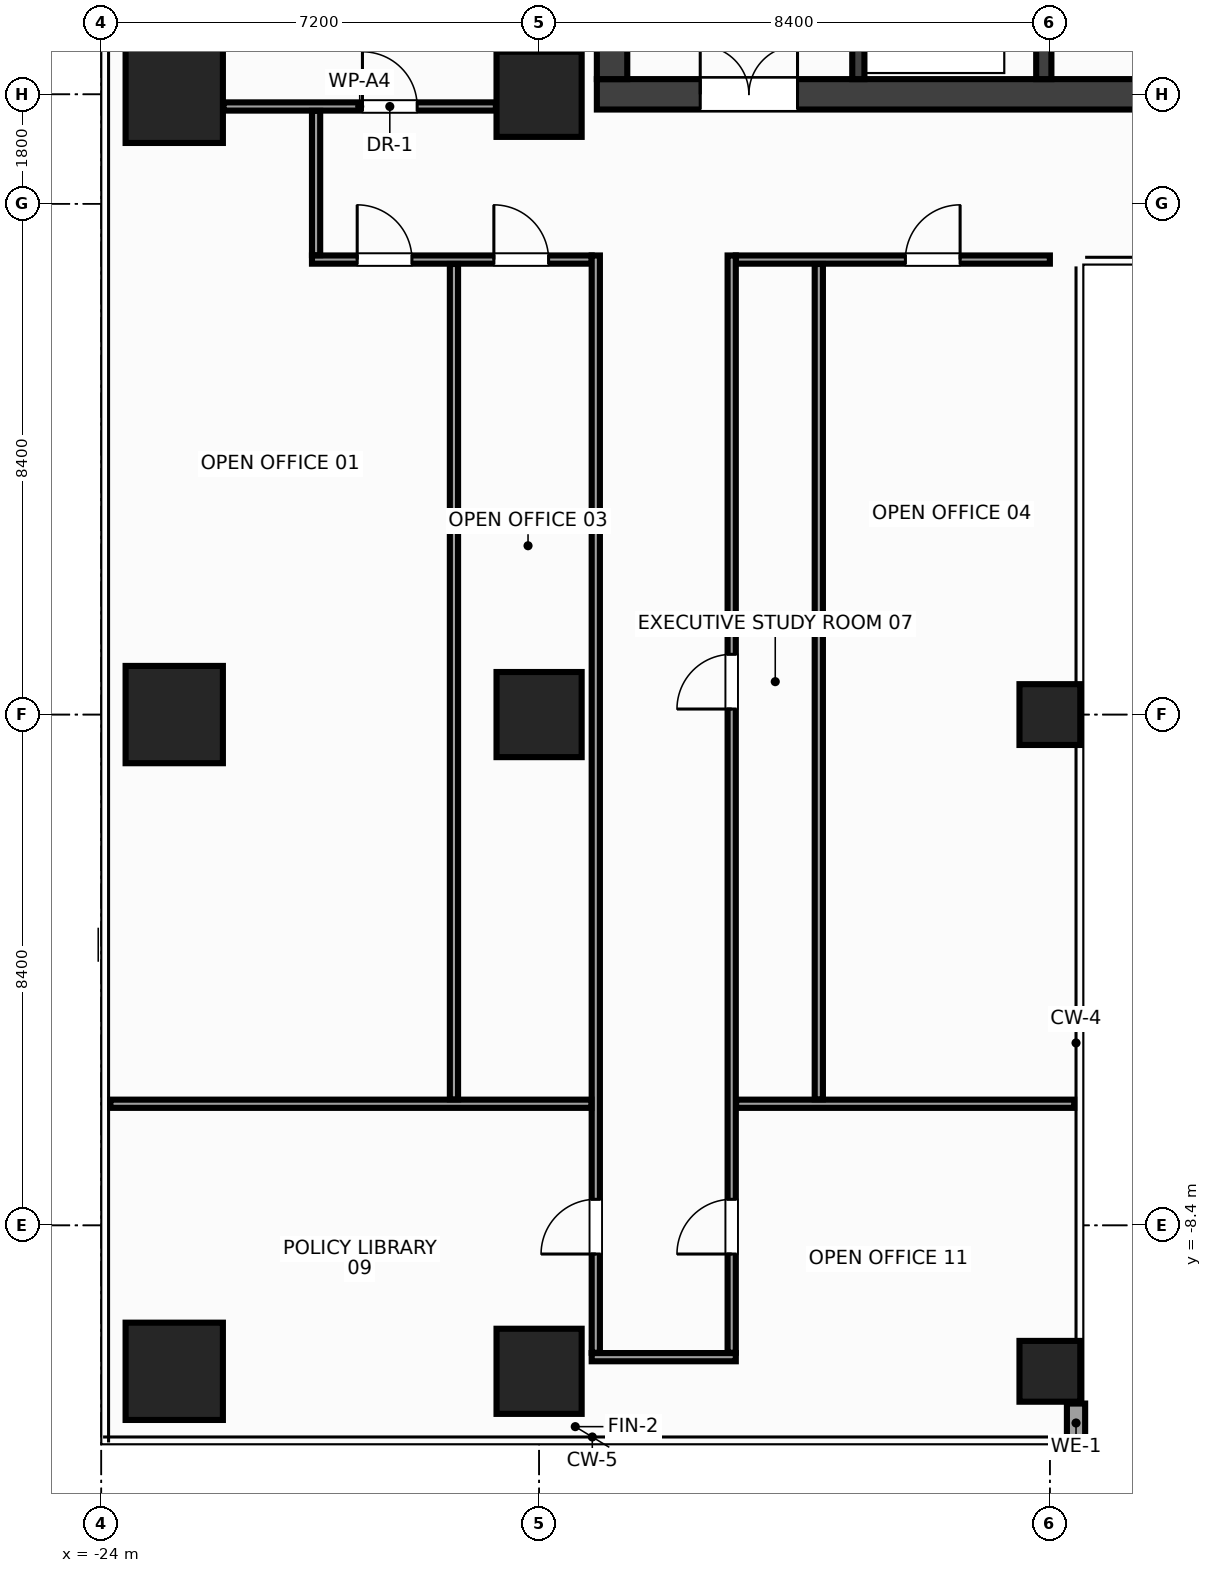
"""IFC4 building model, lengths in metres.
Left out: names, types, materials, properties, quantities, classifications, styles, units other than length and angle.
Written with IfcOpenShell. Run it as: python <this file> out.ifc"""

import sys

from ifc_helpers import new_model, si_unit, direction, frame, frame_2d, origin, origin_2d, place, context, subcontext, project, spatial, rectangle, hollow_rectangle, extrude, source, transform, mapped, element, fill, save


model = new_model("IFC4")
c1 = context("Model", 3, precision=1e-05, world=origin(), true_north=direction((0.0, 1.0)))
c2 = subcontext(c1, "Body", "Model", "MODEL_VIEW")
j1 = project(units=[si_unit("LENGTHUNIT", "METRE"), si_unit("PLANEANGLEUNIT", "RADIAN")], contexts=[c1])
p1 = place(None, origin())
s1 = spatial("IfcSite", under=j1, at=p1, CompositionType="ELEMENT")
p2 = place(p1, origin())
s2 = spatial("IfcBuilding", under=s1, at=p2, CompositionType="ELEMENT")
p3 = place(p2, frame((0.0, 0.0, 200.0)))
s3 = spatial("IfcBuildingStorey", under=s2, at=p3, CompositionType="ELEMENT", Elevation=200.0)
m1 = source(origin(), c2, "Body", "SweptSolid", [
    extrude(rectangle(XDim=31.7, YDim=0.5, at=frame_2d((15.85, 0.0))), origin(), (0.0, 0.0, 1.0), 3.6),
])
p4 = place(p3, frame((-15.85, 10.2, 0.0), z_axis=(0.0, 0.0, 1.0), x_axis=(1.0, 0.0, 0.0)))
e1 = element("IfcWall", 1, at=p4, inside=s3, PredefinedType="SHEAR", context=c2, shape_type="MappedRepresentation", body=[
    mapped(m1, transform((0.0, 0.0, 0.0), x_axis=(1.0, 0.0, 0.0), y_axis=(0.0, 1.0, 0.0), z_axis=(0.0, 0.0, 1.0), scale=1.0)),
])
p5 = place(p4, frame((1.7, 0.0, 0.0)))
e2 = element("IfcOpeningElement", 2, at=p5, cuts=e1, PredefinedType="OPENING", context=c2, shape_type="SweptSolid", body=[
    extrude(rectangle(XDim=1.6, YDim=2.15, at=frame_2d((0.8, 1.075))), frame((0.0, 0.262, 0.0), z_axis=(0.0, -1.0, 0.0), x_axis=(1.0, 0.0, 0.0)), (0.0, 0.0, 1.0), 0.524),
])
p6 = place(p4, frame((28.4, 0.0, 0.0)))
e3 = element("IfcOpeningElement", 3, at=p6, cuts=e1, PredefinedType="OPENING", context=c2, shape_type="SweptSolid", body=[
    extrude(rectangle(XDim=1.6, YDim=2.15, at=frame_2d((0.8, 1.075))), frame((0.0, 0.262, 0.0), z_axis=(0.0, -1.0, 0.0), x_axis=(1.0, 0.0, 0.0)), (0.0, 0.0, 1.0), 0.524),
])
p7 = place(p4, frame((15.1, 0.0, 0.0)))
e4 = element("IfcOpeningElement", 4, at=p7, cuts=e1, PredefinedType="OPENING", context=c2, shape_type="SweptSolid", body=[
    extrude(rectangle(XDim=1.5, YDim=2.2, at=frame_2d((0.75, 1.1))), frame((0.0, 0.262, 0.0), z_axis=(0.0, -1.0, 0.0), x_axis=(1.0, 0.0, 0.0)), (0.0, 0.0, 1.0), 0.524),
])
m2 = source(origin(), c2, "Body", "SweptSolid", [
    extrude(rectangle(XDim=13.1, YDim=0.5, at=frame_2d((6.55, 0.0))), origin(), (0.0, 0.0, 1.0), 3.6),
])
p8 = place(p3, frame((-15.6, 10.45, 0.0), z_axis=(0.0, 0.0, 1.0), x_axis=(0.0, 1.0, 0.0)))
e5 = element("IfcWall", 5, at=p8, inside=s3, PredefinedType="SHEAR", context=c2, shape_type="MappedRepresentation", body=[
    mapped(m2, transform((0.0, 0.0, 0.0), x_axis=(1.0, 0.0, 0.0), y_axis=(0.0, 1.0, 0.0), z_axis=(0.0, 0.0, 1.0), scale=1.0)),
])
m3 = source(origin(), c2, "Body", "SweptSolid", [
    extrude(rectangle(XDim=13.1, YDim=0.25, at=frame_2d((6.55, 0.0))), origin(), (0.0, 0.0, 1.0), 3.6),
])
p9 = place(p3, frame((-8.5, 10.45, 0.0), z_axis=(0.0, 0.0, 1.0), x_axis=(0.0, 1.0, 0.0)))
e6 = element("IfcWall", 6, at=p9, inside=s3, PredefinedType="SHEAR", context=c2, shape_type="MappedRepresentation", body=[
    mapped(m3, transform((0.0, 0.0, 0.0), x_axis=(1.0, 0.0, 0.0), y_axis=(0.0, 1.0, 0.0), z_axis=(0.0, 0.0, 1.0), scale=1.0)),
])
p10 = place(p9, frame((4.22, 0.0, 0.0)))
e7 = element("IfcOpeningElement", 7, at=p10, cuts=e6, PredefinedType="OPENING", context=c2, shape_type="SweptSolid", body=[
    extrude(rectangle(XDim=1.1, YDim=2.15, at=frame_2d((0.55, 1.075))), frame((0.0, 0.137, 0.0), z_axis=(0.0, -1.0, 0.0), x_axis=(1.0, 0.0, 0.0)), (0.0, 0.0, 1.0), 0.274),
])
p11 = place(p9, frame((6.14, 0.0, 0.0)))
e8 = element("IfcOpeningElement", 8, at=p11, cuts=e6, PredefinedType="OPENING", context=c2, shape_type="SweptSolid", body=[
    extrude(rectangle(XDim=1.1, YDim=2.15, at=frame_2d((0.55, 1.075))), frame((0.0, 0.137, 0.0), z_axis=(0.0, -1.0, 0.0), x_axis=(1.0, 0.0, 0.0)), (0.0, 0.0, 1.0), 0.274),
])
p12 = place(p9, frame((8.06, 0.0, 0.0)))
e9 = element("IfcOpeningElement", 9, at=p12, cuts=e6, PredefinedType="OPENING", context=c2, shape_type="SweptSolid", body=[
    extrude(rectangle(XDim=1.1, YDim=2.15, at=frame_2d((0.55, 1.075))), frame((0.0, 0.137, 0.0), z_axis=(0.0, -1.0, 0.0), x_axis=(1.0, 0.0, 0.0)), (0.0, 0.0, 1.0), 0.274),
])
m4 = source(origin(), c2, "Body", "SweptSolid", [
    extrude(rectangle(XDim=3.2, YDim=0.2, at=frame_2d((1.6, 0.0))), origin(), (0.0, 0.0, 1.0), 3.6),
])
p13 = place(p3, frame((-11.55, 10.45, 0.0), z_axis=(0.0, 0.0, 1.0), x_axis=(0.0, 1.0, 0.0)))
e10 = element("IfcWall", 10, at=p13, inside=s3, PredefinedType="SHEAR", context=c2, shape_type="MappedRepresentation", body=[
    mapped(m4, transform((0.0, 0.0, 0.0), x_axis=(1.0, 0.0, 0.0), y_axis=(0.0, 1.0, 0.0), z_axis=(0.0, 0.0, 1.0), scale=1.0)),
])
p14 = place(p13, frame((0.9, 0.0, 0.0)))
e11 = element("IfcOpeningElement", 11, at=p14, cuts=e10, PredefinedType="OPENING", context=c2, shape_type="SweptSolid", body=[
    extrude(rectangle(XDim=1.1, YDim=2.15, at=frame_2d((0.55, 1.075))), frame((0.0, 0.112, 0.0), z_axis=(0.0, -1.0, 0.0), x_axis=(1.0, 0.0, 0.0)), (0.0, 0.0, 1.0), 0.224),
])
m5 = source(origin(), c2, "Body", "SweptSolid", [
    extrude(rectangle(XDim=1.4, YDim=1.4, at=origin_2d()), origin(), (0.0, 0.0, 1.0), 3.6),
])
for number, where, z_axis, x_axis in (
    (12, (-16.8, -10.8, 0.0), (0.0, 0.0, 1.0), (1.0, 0.0, 0.0)),
    (13, (-16.8, 0.0, 0.0), (0.0, 0.0, 1.0), (1.0, 0.0, 0.0)),
    (14, (-16.8, 10.2, 0.0), (0.0, 0.0, 1.0), (1.0, 0.0, 0.0)),
):
    element("IfcColumn", number, at=place(p3, frame(where, z_axis=z_axis, x_axis=x_axis)), inside=s3, PredefinedType="COLUMN", context=c2, shape_type="MappedRepresentation", body=[
        mapped(m5, transform((0.0, 0.0, 0.0), x_axis=(1.0, 0.0, 0.0), y_axis=(0.0, 1.0, 0.0), z_axis=(0.0, 0.0, 1.0), scale=1.0)),
    ])
m6 = source(origin(), c2, "Body", "SweptSolid", [
    extrude(rectangle(XDim=1.6, YDim=1.6, at=origin_2d()), origin(), (0.0, 0.0, 1.0), 3.6),
])
for number, where, z_axis, x_axis in (
    (15, (-22.8, -10.8, 0.0), (0.0, 0.0, 1.0), (1.0, 0.0, 0.0)),
    (16, (-22.8, 0.0, 0.0), (0.0, 0.0, 1.0), (1.0, 0.0, 0.0)),
    (17, (-22.8, 10.2, 0.0), (0.0, 0.0, 1.0), (1.0, 0.0, 0.0)),
):
    element("IfcColumn", number, at=place(p3, frame(where, z_axis=z_axis, x_axis=x_axis)), inside=s3, PredefinedType="COLUMN", context=c2, shape_type="MappedRepresentation", body=[
        mapped(m6, transform((0.0, 0.0, 0.0), x_axis=(1.0, 0.0, 0.0), y_axis=(0.0, 1.0, 0.0), z_axis=(0.0, 0.0, 1.0), scale=1.0)),
    ])
m7 = source(origin(), c2, "Body", "SweptSolid", [
    extrude(hollow_rectangle(XDim=1.0, YDim=1.0, WallThickness=0.045, at=origin_2d()), origin(), (0.0, 0.0, 1.0), 3.6),
])
for number, where, z_axis, x_axis in (
    (18, (-8.4, 0.0, 0.0), (0.0, 0.0, 1.0), (1.0, 0.0, 0.0)),
    (19, (-8.4, -10.8, 0.0), (0.0, 0.0, 1.0), (1.0, 0.0, 0.0)),
):
    element("IfcColumn", number, at=place(p3, frame(where, z_axis=z_axis, x_axis=x_axis)), inside=s3, PredefinedType="COLUMN", context=c2, shape_type="MappedRepresentation", body=[
        mapped(m7, transform((0.0, 0.0, 0.0), x_axis=(1.0, 0.0, 0.0), y_axis=(0.0, 1.0, 0.0), z_axis=(0.0, 0.0, 1.0), scale=1.0)),
    ])
m8 = source(origin(), c2, "Body", "SweptSolid", [
    extrude(rectangle(XDim=0.64, YDim=0.24, at=frame_2d((0.32, 0.0))), origin(), (0.0, 0.0, 1.0), 2.76),
])
p15 = place(p3, frame((-7.97, -11.97, 0.0), z_axis=(0.0, 0.0, 1.0), x_axis=(0.0, 1.0, 0.0)))
e20 = element("IfcWall", 20, at=p15, inside=s3, PredefinedType="STANDARD", context=c2, shape_type="MappedRepresentation", body=[
    mapped(m8, transform((0.0, 0.0, 0.0), x_axis=(1.0, 0.0, 0.0), y_axis=(0.0, 1.0, 0.0), z_axis=(0.0, 0.0, 1.0), scale=1.0)),
])
m9 = source(origin(), c2, "Body", "SweptSolid", [
    extrude(rectangle(XDim=4.48, YDim=0.135, at=frame_2d((2.24, 0.0))), origin(), (0.0, 0.0, 1.0), 2.915),
])
p16 = place(p3, frame((-21.99, 10.0, 0.0), z_axis=(0.0, 0.0, 1.0), x_axis=(1.0, 0.0, 0.0)))
e21 = element("IfcWall", 21, at=p16, inside=s3, PredefinedType="PARTITIONING", context=c2, shape_type="MappedRepresentation", body=[
    mapped(m9, transform((0.0, 0.0, 0.0), x_axis=(1.0, 0.0, 0.0), y_axis=(0.0, 1.0, 0.0), z_axis=(0.0, 0.0, 1.0), scale=1.0)),
])
p17 = place(p16, frame((2.285, 0.0, 0.0)))
e22 = element("IfcOpeningElement", 22, at=p17, cuts=e21, PredefinedType="OPENING", context=c2, shape_type="SweptSolid", body=[
    extrude(rectangle(XDim=0.9, YDim=2.15, at=frame_2d((0.45, 1.075))), frame((0.0, 0.08, 0.0), z_axis=(0.0, -1.0, 0.0), x_axis=(1.0, 0.0, 0.0)), (0.0, 0.0, 1.0), 0.159),
])
m10 = source(origin(), c2, "Body", "SweptSolid", [
    extrude(rectangle(XDim=4.6, YDim=0.135, at=frame_2d((2.3, 0.0))), origin(), (0.0, 0.0, 1.0), 2.765),
])
p18 = place(p3, frame((-20.535, 7.482, 0.0), z_axis=(0.0, 0.0, 1.0), x_axis=(1.0, 0.0, 0.0)))
e23 = element("IfcWall", 23, at=p18, inside=s3, PredefinedType="PARTITIONING", context=c2, shape_type="MappedRepresentation", body=[
    mapped(m10, transform((0.0, 0.0, 0.0), x_axis=(1.0, 0.0, 0.0), y_axis=(0.0, 1.0, 0.0), z_axis=(0.0, 0.0, 1.0), scale=1.0)),
])
p19 = place(p18, frame((0.744, 0.0, 0.0)))
e24 = element("IfcOpeningElement", 24, at=p19, cuts=e23, PredefinedType="OPENING", context=c2, shape_type="SweptSolid", body=[
    extrude(rectangle(XDim=0.9, YDim=2.15, at=frame_2d((0.45, 1.075))), frame((0.0, 0.08, 0.0), z_axis=(0.0, -1.0, 0.0), x_axis=(1.0, 0.0, 0.0)), (0.0, 0.0, 1.0), 0.159),
])
p20 = place(p18, frame((2.991, 0.0, 0.0)))
e25 = element("IfcOpeningElement", 25, at=p20, cuts=e23, PredefinedType="OPENING", context=c2, shape_type="SweptSolid", body=[
    extrude(rectangle(XDim=0.9, YDim=2.15, at=frame_2d((0.45, 1.075))), frame((0.0, 0.08, 0.0), z_axis=(0.0, -1.0, 0.0), x_axis=(1.0, 0.0, 0.0)), (0.0, 0.0, 1.0), 0.159),
])
m11 = source(origin(), c2, "Body", "SweptSolid", [
    extrude(rectangle(XDim=5.165, YDim=0.135, at=frame_2d((2.583, 0.0))), origin(), (0.0, 0.0, 1.0), 3.38),
])
p21 = place(p3, frame((-13.565, 7.482, 0.0), z_axis=(0.0, 0.0, 1.0), x_axis=(1.0, 0.0, 0.0)))
e26 = element("IfcWall", 26, at=p21, inside=s3, PredefinedType="PARTITIONING", context=c2, shape_type="MappedRepresentation", body=[
    mapped(m11, transform((0.0, 0.0, 0.0), x_axis=(1.0, 0.0, 0.0), y_axis=(0.0, 1.0, 0.0), z_axis=(0.0, 0.0, 1.0), scale=1.0)),
])
p22 = place(p21, frame((2.789, 0.0, 0.0)))
e27 = element("IfcOpeningElement", 27, at=p22, cuts=e26, PredefinedType="OPENING", context=c2, shape_type="SweptSolid", body=[
    extrude(rectangle(XDim=0.9, YDim=2.15, at=frame_2d((0.45, 1.075))), frame((0.0, 0.08, 0.0), z_axis=(0.0, -1.0, 0.0), x_axis=(1.0, 0.0, 0.0)), (0.0, 0.0, 1.0), 0.159),
])
m12 = source(origin(), c2, "Body", "SweptSolid", [
    extrude(rectangle(XDim=2.37, YDim=0.135, at=frame_2d((1.185, 0.0))), origin(), (0.0, 0.0, 1.0), 3.38),
])
p23 = place(p3, frame((-15.935, -10.567, 0.0), z_axis=(0.0, 0.0, 1.0), x_axis=(1.0, 0.0, 0.0)))
e28 = element("IfcWall", 28, at=p23, inside=s3, PredefinedType="PARTITIONING", context=c2, shape_type="MappedRepresentation", body=[
    mapped(m12, transform((0.0, 0.0, 0.0), x_axis=(1.0, 0.0, 0.0), y_axis=(0.0, 1.0, 0.0), z_axis=(0.0, 0.0, 1.0), scale=1.0)),
])
m13 = source(origin(), c2, "Body", "SweptSolid", [
    extrude(rectangle(XDim=2.373, YDim=0.135, at=frame_2d((1.186, 0.0))), origin(), (0.0, 0.0, 1.0), 3.38),
])
p24 = place(p3, frame((-20.468, 7.555, 0.0), z_axis=(0.0, 0.0, 1.0), x_axis=(0.0, 1.0, 0.0)))
e29 = element("IfcWall", 29, at=p24, inside=s3, PredefinedType="PARTITIONING", context=c2, shape_type="MappedRepresentation", body=[
    mapped(m13, transform((0.0, 0.0, 0.0), x_axis=(1.0, 0.0, 0.0), y_axis=(0.0, 1.0, 0.0), z_axis=(0.0, 0.0, 1.0), scale=1.0)),
])
m14 = source(origin(), c2, "Body", "SweptSolid", [
    extrude(rectangle(XDim=18.045, YDim=0.135, at=frame_2d((9.022, 0.0))), origin(), (0.0, 0.0, 1.0), 2.915),
])
p25 = place(p3, frame((-15.867, -10.495, 0.0), z_axis=(0.0, 0.0, 1.0), x_axis=(0.0, 1.0, 0.0)))
e30 = element("IfcWall", 30, at=p25, inside=s3, PredefinedType="PARTITIONING", context=c2, shape_type="MappedRepresentation", body=[
    mapped(m14, transform((0.0, 0.0, 0.0), x_axis=(1.0, 0.0, 0.0), y_axis=(0.0, 1.0, 0.0), z_axis=(0.0, 0.0, 1.0), scale=1.0)),
])
p26 = place(p25, frame((1.624, 0.0, 0.0)))
e31 = element("IfcOpeningElement", 31, at=p26, cuts=e30, PredefinedType="OPENING", context=c2, shape_type="SweptSolid", body=[
    extrude(rectangle(XDim=0.9, YDim=2.15, at=frame_2d((0.45, 1.075))), frame((0.0, 0.08, 0.0), z_axis=(0.0, -1.0, 0.0), x_axis=(1.0, 0.0, 0.0)), (0.0, 0.0, 1.0), 0.159),
])
p27 = place(p3, frame((-13.633, -10.495, 0.0), z_axis=(0.0, 0.0, 1.0), x_axis=(0.0, 1.0, 0.0)))
e32 = element("IfcWall", 32, at=p27, inside=s3, PredefinedType="PARTITIONING", context=c2, shape_type="MappedRepresentation", body=[
    mapped(m14, transform((0.0, 0.0, 0.0), x_axis=(1.0, 0.0, 0.0), y_axis=(0.0, 1.0, 0.0), z_axis=(0.0, 0.0, 1.0), scale=1.0)),
])
p28 = place(p27, frame((10.586, 0.0, 0.0)))
e33 = element("IfcOpeningElement", 33, at=p28, cuts=e32, PredefinedType="OPENING", context=c2, shape_type="SweptSolid", body=[
    extrude(rectangle(XDim=0.9, YDim=2.15, at=frame_2d((0.45, 1.075))), frame((0.0, 0.08, 0.0), z_axis=(0.0, -1.0, 0.0), x_axis=(1.0, 0.0, 0.0)), (0.0, 0.0, 1.0), 0.159),
])
p29 = place(p27, frame((1.624, 0.0, 0.0)))
e34 = element("IfcOpeningElement", 34, at=p29, cuts=e32, PredefinedType="OPENING", context=c2, shape_type="SweptSolid", body=[
    extrude(rectangle(XDim=0.9, YDim=2.15, at=frame_2d((0.45, 1.075))), frame((0.0, 0.08, 0.0), z_axis=(0.0, -1.0, 0.0), x_axis=(1.0, 0.0, 0.0)), (0.0, 0.0, 1.0), 0.159),
])
m15 = source(origin(), c2, "Body", "SweptSolid", [
    extrude(rectangle(XDim=7.91, YDim=0.135, at=frame_2d((3.955, 0.0))), origin(), (0.0, 0.0, 1.0), 2.765),
])
p30 = place(p3, frame((-23.85, -6.4, 0.0), z_axis=(0.0, 0.0, 1.0), x_axis=(1.0, 0.0, 0.0)))
e35 = element("IfcWall", 35, at=p30, inside=s3, PredefinedType="PARTITIONING", context=c2, shape_type="MappedRepresentation", body=[
    mapped(m15, transform((0.0, 0.0, 0.0), x_axis=(1.0, 0.0, 0.0), y_axis=(0.0, 1.0, 0.0), z_axis=(0.0, 0.0, 1.0), scale=1.0)),
])
m16 = source(origin(), c2, "Body", "SweptSolid", [
    extrude(rectangle(XDim=5.56, YDim=0.135, at=frame_2d((2.78, 0.0))), origin(), (0.0, 0.0, 1.0), 2.765),
])
p31 = place(p3, frame((-13.56, -6.4, 0.0), z_axis=(0.0, 0.0, 1.0), x_axis=(1.0, 0.0, 0.0)))
e36 = element("IfcWall", 36, at=p31, inside=s3, PredefinedType="PARTITIONING", context=c2, shape_type="MappedRepresentation", body=[
    mapped(m16, transform((0.0, 0.0, 0.0), x_axis=(1.0, 0.0, 0.0), y_axis=(0.0, 1.0, 0.0), z_axis=(0.0, 0.0, 1.0), scale=1.0)),
])
m17 = source(origin(), c2, "Body", "SweptSolid", [
    extrude(rectangle(XDim=13.737, YDim=0.135, at=frame_2d((6.869, 0.0))), origin(), (0.0, 0.0, 1.0), 2.915),
])
for number, where, z_axis, x_axis in (
    (37, (-18.2, -6.327, 0.0), (0.0, 0.0, 1.0), (0.0, 1.0, 0.0)),
    (38, (-12.2, -6.327, 0.0), (0.0, 0.0, 1.0), (0.0, 1.0, 0.0)),
):
    element("IfcWall", number, at=place(p3, frame(where, z_axis=z_axis, x_axis=x_axis)), inside=s3, PredefinedType="PARTITIONING", context=c2, shape_type="MappedRepresentation", body=[
        mapped(m17, transform((0.0, 0.0, 0.0), x_axis=(1.0, 0.0, 0.0), y_axis=(0.0, 1.0, 0.0), z_axis=(0.0, 0.0, 1.0), scale=1.0)),
    ])
m18 = source(origin(), c2, "Body", "SweptSolid", [
    extrude(rectangle(XDim=1.6, YDim=2.15, at=frame_2d((0.8, 1.075))), frame((0.0, 0.025, 0.0), z_axis=(0.0, -1.0, 0.0), x_axis=(1.0, 0.0, 0.0)), (0.0, 0.0, 1.0), 0.05),
])
p32 = place(p5, origin())
e39 = element("IfcDoor", 39, at=p32, inside=s3, OperationType="DOUBLE_DOOR_SINGLE_SWING", PredefinedType="DOOR", context=c2, shape_type="MappedRepresentation", body=[
    mapped(m18, transform((0.0, 0.0, 0.0), x_axis=(1.0, 0.0, 0.0), y_axis=(0.0, 1.0, 0.0), z_axis=(0.0, 0.0, 1.0), scale=1.0)),
])
fill(e2, e39)
m19 = source(origin(), c2, "Body", "SweptSolid", [
    extrude(rectangle(XDim=0.9, YDim=2.15, at=frame_2d((0.45, 1.075))), frame((0.0, 0.025, 0.0), z_axis=(0.0, -1.0, 0.0), x_axis=(1.0, 0.0, 0.0)), (0.0, 0.0, 1.0), 0.05),
])
p33 = place(p17, origin())
e40 = element("IfcDoor", 40, at=p33, inside=s3, OperationType="SINGLE_SWING_LEFT", PredefinedType="DOOR", context=c2, shape_type="MappedRepresentation", body=[
    mapped(m19, transform((0.0, 0.0, 0.0), x_axis=(1.0, 0.0, 0.0), y_axis=(0.0, 1.0, 0.0), z_axis=(0.0, 0.0, 1.0), scale=1.0)),
])
fill(e22, e40)
p34 = place(p19, origin())
e41 = element("IfcDoor", 41, at=p34, inside=s3, OperationType="SINGLE_SWING_LEFT", PredefinedType="DOOR", context=c2, shape_type="MappedRepresentation", body=[
    mapped(m19, transform((0.0, 0.0, 0.0), x_axis=(1.0, 0.0, 0.0), y_axis=(0.0, 1.0, 0.0), z_axis=(0.0, 0.0, 1.0), scale=1.0)),
])
fill(e24, e41)
p35 = place(p20, origin())
e42 = element("IfcDoor", 42, at=p35, inside=s3, OperationType="SINGLE_SWING_LEFT", PredefinedType="DOOR", context=c2, shape_type="MappedRepresentation", body=[
    mapped(m19, transform((0.0, 0.0, 0.0), x_axis=(1.0, 0.0, 0.0), y_axis=(0.0, 1.0, 0.0), z_axis=(0.0, 0.0, 1.0), scale=1.0)),
])
fill(e25, e42)
p36 = place(p22, origin())
e43 = element("IfcDoor", 43, at=p36, inside=s3, OperationType="SINGLE_SWING_RIGHT", PredefinedType="DOOR", context=c2, shape_type="MappedRepresentation", body=[
    mapped(m19, transform((0.0, 0.0, 0.0), x_axis=(1.0, 0.0, 0.0), y_axis=(0.0, 1.0, 0.0), z_axis=(0.0, 0.0, 1.0), scale=1.0)),
])
fill(e27, e43)
p37 = place(p28, origin())
e44 = element("IfcDoor", 44, at=p37, inside=s3, OperationType="SINGLE_SWING_LEFT", PredefinedType="DOOR", context=c2, shape_type="MappedRepresentation", body=[
    mapped(m19, transform((0.0, 0.0, 0.0), x_axis=(1.0, 0.0, 0.0), y_axis=(0.0, 1.0, 0.0), z_axis=(0.0, 0.0, 1.0), scale=1.0)),
])
fill(e33, e44)
p38 = place(p26, origin())
e45 = element("IfcDoor", 45, at=p38, inside=s3, OperationType="SINGLE_SWING_LEFT", PredefinedType="DOOR", context=c2, shape_type="MappedRepresentation", body=[
    mapped(m19, transform((0.0, 0.0, 0.0), x_axis=(1.0, 0.0, 0.0), y_axis=(0.0, 1.0, 0.0), z_axis=(0.0, 0.0, 1.0), scale=1.0)),
])
fill(e31, e45)
p39 = place(p29, origin())
e46 = element("IfcDoor", 46, at=p39, inside=s3, OperationType="SINGLE_SWING_LEFT", PredefinedType="DOOR", context=c2, shape_type="MappedRepresentation", body=[
    mapped(m19, transform((0.0, 0.0, 0.0), x_axis=(1.0, 0.0, 0.0), y_axis=(0.0, 1.0, 0.0), z_axis=(0.0, 0.0, 1.0), scale=1.0)),
])
fill(e34, e46)
save(model, sys.argv[1])
